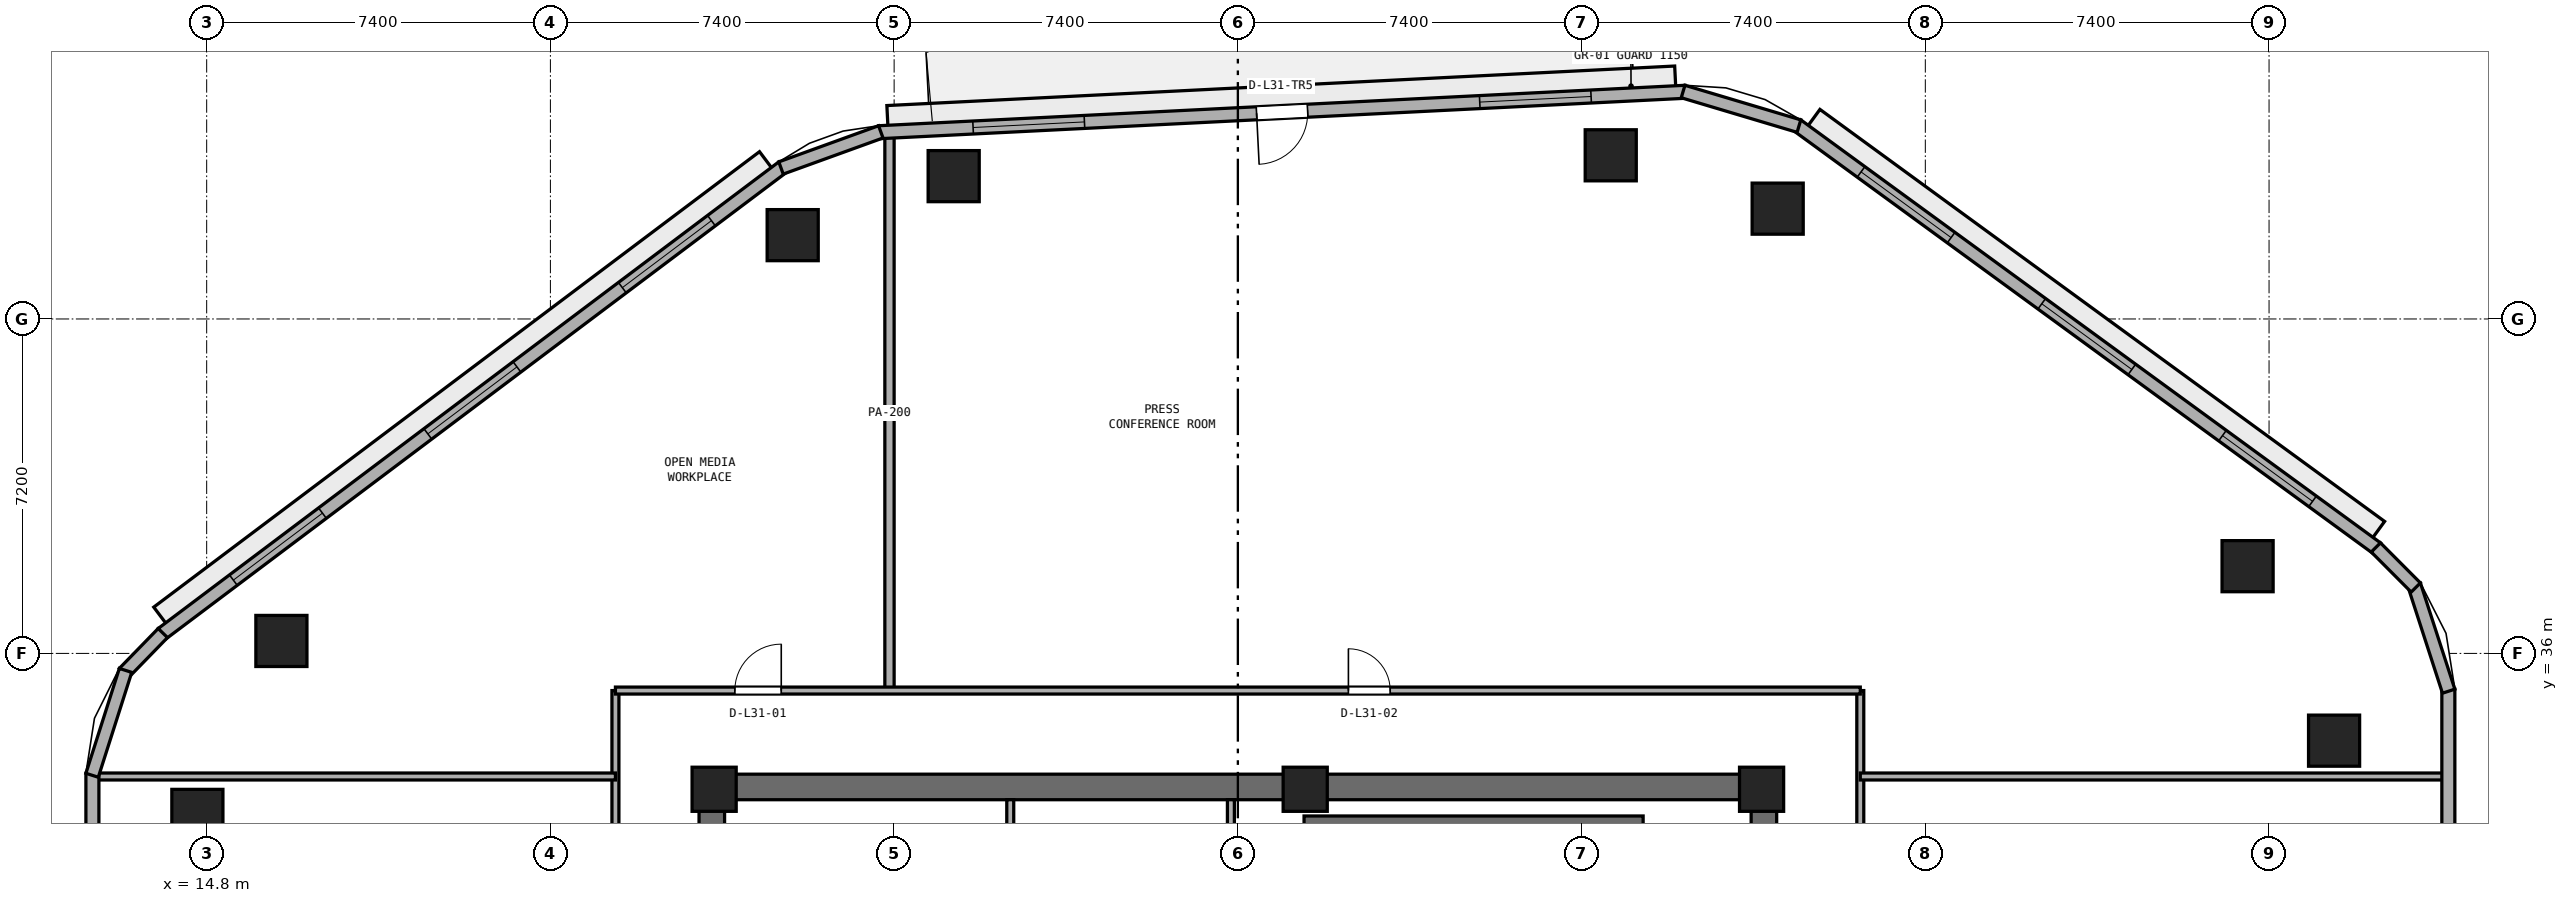
"""IFC4 building model, lengths in metres.
Left out: names, types, materials, properties, quantities, classifications, styles, units other than length and angle.
Written with IfcOpenShell. Run it as: python <this file> out.ifc"""

import sys

from ifc_helpers import new_model, si_unit, direction, frame, frame_2d, origin, origin_2d, place, context, subcontext, project, spatial, rectangle, extrude, element, fill, save


model = new_model("IFC4")
c1 = context("Model", 3, precision=1e-05, world=origin(), true_north=direction((0.0, 1.0)))
c2 = subcontext(c1, "Body", "Model", "MODEL_VIEW")
j1 = project(units=[si_unit("LENGTHUNIT", "METRE"), si_unit("PLANEANGLEUNIT", "RADIAN")], contexts=[c1])
p1 = place(None, origin())
s1 = spatial("IfcSite", under=j1, at=p1, CompositionType="ELEMENT")
p2 = place(p1, origin())
s2 = spatial("IfcBuilding", under=s1, at=p2, CompositionType="ELEMENT")
p3 = place(p2, frame((0.0, 0.0, 125.0)))
s3 = spatial("IfcBuildingStorey", under=s2, at=p3, CompositionType="ELEMENT", Elevation=125.0)
p4 = place(p3, frame((25.4, 33.125, 0.0), z_axis=(0.0, 0.0, 1.0), x_axis=(1.0, 0.0, 0.0)))
e1 = element("IfcWall", 1, at=p4, inside=s3, PredefinedType="SHEAR", context=c2, shape_type="SweptSolid", body=[
    extrude(rectangle(XDim=23.2, YDim=0.55, at=frame_2d((11.6, 0.0))), origin(), (0.0, 0.0, 1.0), 3.54),
])
p5 = place(p3, frame((25.675, 17.55, 0.0), z_axis=(0.0, 0.0, 1.0), x_axis=(0.0, 1.0, 0.0)))
e2 = element("IfcWall", 2, at=p5, inside=s3, PredefinedType="SHEAR", context=c2, shape_type="SweptSolid", body=[
    extrude(rectangle(XDim=15.3, YDim=0.55, at=frame_2d((7.65, 0.0))), origin(), (0.0, 0.0, 1.0), 3.54),
])
p6 = place(p5, frame((6.9, 0.0, 0.0)))
e3 = element("IfcOpeningElement", 3, at=p6, cuts=e2, PredefinedType="OPENING", context=c2, shape_type="SweptSolid", body=[
    extrude(rectangle(XDim=1.5, YDim=2.15, at=frame_2d((0.75, 1.075))), frame((0.0, 0.285, 0.0), z_axis=(0.0, -1.0, 0.0), x_axis=(1.0, 0.0, 0.0)), (0.0, 0.0, 1.0), 0.57),
])
p7 = place(p3, frame((48.325, 17.55, 0.0), z_axis=(0.0, 0.0, 1.0), x_axis=(0.0, 1.0, 0.0)))
e4 = element("IfcWall", 4, at=p7, inside=s3, PredefinedType="SHEAR", context=c2, shape_type="SweptSolid", body=[
    extrude(rectangle(XDim=15.3, YDim=0.55, at=frame_2d((7.65, 0.0))), origin(), (0.0, 0.0, 1.0), 3.54),
])
p8 = place(p7, frame((5.75, 0.0, 0.0)))
e5 = element("IfcOpeningElement", 5, at=p8, cuts=e4, PredefinedType="OPENING", context=c2, shape_type="SweptSolid", body=[
    extrude(rectangle(XDim=1.5, YDim=2.15, at=frame_2d((0.75, 1.075))), frame((0.0, 0.285, 0.0), z_axis=(0.0, -1.0, 0.0), x_axis=(1.0, 0.0, 0.0)), (0.0, 0.0, 1.0), 0.57),
])
for number, where, z_axis, x_axis in (
    (6, (48.275, 33.075, 0.0), (0.0, 0.0, 1.0), (1.0, 0.0, 0.0)),
    (7, (38.45, 33.075, 0.0), (0.0, 0.0, 1.0), (1.0, 0.0, 0.0)),
    (8, (25.725, 33.075, 0.0), (0.0, 0.0, 1.0), (1.0, 0.0, 0.0)),
):
    element("IfcColumn", number, at=place(p3, frame(where, z_axis=z_axis, x_axis=x_axis)), inside=s3, PredefinedType="PILASTER", context=c2, shape_type="SweptSolid", body=[
        extrude(rectangle(XDim=0.95, YDim=0.95, at=origin_2d()), origin(), (0.0, 0.0, 1.0), 3.8),
    ])
for number, where, z_axis, x_axis in (
    (9, (60.6, 34.122, 0.0), (0.0, 0.0, 1.0), (1.0, 0.0, 0.0)),
    (10, (58.738, 37.878, 0.0), (0.0, 0.0, 1.0), (1.0, 0.0, 0.0)),
    (11, (48.622, 45.575, 0.0), (0.0, 0.0, 1.0), (1.0, 0.0, 0.0)),
    (12, (45.028, 46.724, 0.0), (0.0, 0.0, 1.0), (1.0, 0.0, 0.0)),
    (13, (30.882, 46.275, 0.0), (0.0, 0.0, 1.0), (1.0, 0.0, 0.0)),
    (14, (27.416, 45.004, 0.0), (0.0, 0.0, 1.0), (1.0, 0.0, 0.0)),
    (15, (16.409, 36.268, 0.0), (0.0, 0.0, 1.0), (1.0, 0.0, 0.0)),
    (16, (14.6, 32.523, 0.0), (0.0, 0.0, 1.0), (1.0, 0.0, 0.0)),
):
    element("IfcColumn", number, at=place(p3, frame(where, z_axis=z_axis, x_axis=x_axis)), inside=s3, PredefinedType="COLUMN", context=c2, shape_type="SweptSolid", body=[
        extrude(rectangle(XDim=1.1, YDim=1.1, at=origin_2d()), origin(), (0.0, 0.0, 1.0), 3.8),
    ])
p9 = place(p3, frame((38.425, 32.375, 0.0), z_axis=(0.0, 0.0, 1.0), x_axis=(1.0, 0.0, 0.0)))
e17 = element("IfcWall", 17, at=p9, inside=s3, PredefinedType="SHEAR", context=c2, shape_type="SweptSolid", body=[
    extrude(rectangle(XDim=7.3, YDim=0.25, at=frame_2d((3.65, 0.0))), origin(), (0.0, 0.0, 1.0), 3.54),
])
for number, where, z_axis, x_axis in (
    (18, (32.1, 30.65, 0.0), (0.0, 0.0, 1.0), (0.0, 1.0, 0.0)),
    (19, (36.85, 30.65, 0.0), (0.0, 0.0, 1.0), (0.0, 1.0, 0.0)),
):
    element("IfcWall", number, at=place(p3, frame(where, z_axis=z_axis, x_axis=x_axis)), inside=s3, PredefinedType="PARTITIONING", context=c2, shape_type="SweptSolid", body=[
        extrude(rectangle(XDim=2.2, YDim=0.15, at=frame_2d((1.1, 0.0))), origin(), (0.0, 0.0, 1.0), 3.54),
    ])
p10 = place(p3, frame((50.4, 26.8, 0.0), z_axis=(0.0, 0.0, 1.0), x_axis=(0.0, 1.0, 0.0)))
e20 = element("IfcWall", 20, at=p10, inside=s3, PredefinedType="PARTITIONING", context=c2, shape_type="SweptSolid", body=[
    extrude(rectangle(XDim=8.4, YDim=0.15, at=frame_2d((4.2, 0.0))), origin(), (0.0, 0.0, 1.0), 3.54),
])
p11 = place(p10, frame((4.375, 0.0, 0.0)))
e21 = element("IfcOpeningElement", 21, at=p11, cuts=e20, PredefinedType="OPENING", context=c2, shape_type="SweptSolid", body=[
    extrude(rectangle(XDim=0.9, YDim=2.1, at=frame_2d((0.45, 1.05))), frame((0.0, 0.085, 0.0), z_axis=(0.0, -1.0, 0.0), x_axis=(1.0, 0.0, 0.0)), (0.0, 0.0, 1.0), 0.17),
])
p12 = place(p3, frame((29.5, 35.2, 0.0), z_axis=(0.0, 0.0, 1.0), x_axis=(0.0, 1.0, 0.0)))
e22 = element("IfcWall", 22, at=p12, inside=s3, PredefinedType="PARTITIONING", context=c2, shape_type="SweptSolid", body=[
    extrude(rectangle(XDim=11.967, YDim=0.2, at=frame_2d((5.983, 0.0))), origin(), (0.0, 0.0, 1.0), 3.54),
])
p13 = place(p3, frame((23.6, 26.55, 0.0), z_axis=(0.0, 0.0, 1.0), x_axis=(0.0, 1.0, 0.0)))
e23 = element("IfcWall", 23, at=p13, inside=s3, PredefinedType="PARTITIONING", context=c2, shape_type="SweptSolid", body=[
    extrude(rectangle(XDim=8.65, YDim=0.15, at=frame_2d((4.325, 0.0))), origin(), (0.0, 0.0, 1.0), 3.54),
])
p14 = place(p3, frame((12.405, 33.35, 0.0), z_axis=(0.0, 0.0, 1.0), x_axis=(1.0, 0.0, 0.0)))
e24 = element("IfcWall", 24, at=p14, inside=s3, PredefinedType="PARTITIONING", context=c2, shape_type="SweptSolid", body=[
    extrude(rectangle(XDim=11.195, YDim=0.15, at=frame_2d((5.598, 0.0))), origin(), (0.0, 0.0, 1.0), 2.79),
])
p15 = place(p3, frame((50.4, 33.35, 0.0), z_axis=(0.0, 0.0, 1.0), x_axis=(1.0, 0.0, 0.0)))
e25 = element("IfcWall", 25, at=p15, inside=s3, PredefinedType="PARTITIONING", context=c2, shape_type="SweptSolid", body=[
    extrude(rectangle(XDim=12.595, YDim=0.15, at=frame_2d((6.298, 0.0))), origin(), (0.0, 0.0, 1.0), 2.923),
])
p16 = place(p3, frame((23.6, 35.2, 0.0), z_axis=(0.0, 0.0, 1.0), x_axis=(1.0, 0.0, 0.0)))
e26 = element("IfcWall", 26, at=p16, inside=s3, PredefinedType="PARTITIONING", context=c2, shape_type="SweptSolid", body=[
    extrude(rectangle(XDim=26.8, YDim=0.15, at=frame_2d((13.4, 0.0))), origin(), (0.0, 0.0, 1.0), 3.54),
])
p17 = place(p16, frame((2.57, 0.0, 0.0)))
e27 = element("IfcOpeningElement", 27, at=p17, cuts=e26, PredefinedType="OPENING", context=c2, shape_type="SweptSolid", body=[
    extrude(rectangle(XDim=1.0, YDim=2.12, at=frame_2d((0.5, 1.06))), frame((0.0, 0.085, 0.0), z_axis=(0.0, -1.0, 0.0), x_axis=(1.0, 0.0, 0.0)), (0.0, 0.0, 1.0), 0.17),
])
p18 = place(p16, frame((15.78, 0.0, 0.0)))
e28 = element("IfcOpeningElement", 28, at=p18, cuts=e26, PredefinedType="OPENING", context=c2, shape_type="SweptSolid", body=[
    extrude(rectangle(XDim=0.9, YDim=2.1, at=frame_2d((0.45, 1.05))), frame((0.0, 0.085, 0.0), z_axis=(0.0, -1.0, 0.0), x_axis=(1.0, 0.0, 0.0)), (0.0, 0.0, 1.0), 0.17),
])
p19 = place(p3, frame((63.06, 28.27, 0.0), z_axis=(0.0, 0.0, 1.0), x_axis=(0.0, 1.0, 0.0)))
e29 = element("IfcWall", 29, at=p19, inside=s3, PredefinedType="STANDARD", context=c2, shape_type="SweptSolid", body=[
    extrude(rectangle(XDim=6.96, YDim=0.28, at=frame_2d((3.48, 0.0))), origin(), (0.0, 0.0, 1.0), 3.54),
])
p20 = place(p3, frame((61.516, 38.267, 0.0), z_axis=(0.0, 0.0, 1.0), x_axis=(-0.807812505785, 0.589439526582, 0.0)))
e30 = element("IfcWall", 30, at=p20, inside=s3, PredefinedType="STANDARD", context=c2, shape_type="SweptSolid", body=[
    extrude(rectangle(XDim=15.448, YDim=0.28, at=frame_2d((7.724, 0.0))), origin(), (0.0, 0.0, 1.0), 3.54),
])
p21 = place(p20, frame((1.708, 0.0, 0.9)))
e31 = element("IfcOpeningElement", 31, at=p21, cuts=e30, PredefinedType="OPENING", context=c2, shape_type="SweptSolid", body=[
    extrude(rectangle(XDim=2.4, YDim=1.75, at=frame_2d((1.2, 0.875))), frame((0.0, 0.15, 0.0), z_axis=(0.0, -1.0, 0.0), x_axis=(1.0, 0.0, 0.0)), (0.0, 0.0, 1.0), 0.3),
])
p22 = place(p20, frame((6.524, 0.0, 0.9)))
e32 = element("IfcOpeningElement", 32, at=p22, cuts=e30, PredefinedType="OPENING", context=c2, shape_type="SweptSolid", body=[
    extrude(rectangle(XDim=2.4, YDim=1.75, at=frame_2d((1.2, 0.875))), frame((0.0, 0.15, 0.0), z_axis=(0.0, -1.0, 0.0), x_axis=(1.0, 0.0, 0.0)), (0.0, 0.0, 1.0), 0.3),
])
p23 = place(p20, frame((11.34, 0.0, 0.9)))
e33 = element("IfcOpeningElement", 33, at=p23, cuts=e30, PredefinedType="OPENING", context=c2, shape_type="SweptSolid", body=[
    extrude(rectangle(XDim=2.4, YDim=1.75, at=frame_2d((1.2, 0.875))), frame((0.0, 0.15, 0.0), z_axis=(0.0, -1.0, 0.0), x_axis=(1.0, 0.0, 0.0)), (0.0, 0.0, 1.0), 0.3),
])
p24 = place(p3, frame((46.632, 48.091, 0.0), z_axis=(0.0, 0.0, 1.0), x_axis=(-0.998744129094, -0.050101542886, 0.0)))
e34 = element("IfcWall", 34, at=p24, inside=s3, PredefinedType="STANDARD", context=c2, shape_type="SweptSolid", body=[
    extrude(rectangle(XDim=17.382, YDim=0.28, at=frame_2d((8.691, 0.0))), origin(), (0.0, 0.0, 1.0), 3.54),
])
p25 = place(p24, frame((8.141, 0.0, 0.0)))
e35 = element("IfcOpeningElement", 35, at=p25, cuts=e34, PredefinedType="OPENING", context=c2, shape_type="SweptSolid", body=[
    extrude(rectangle(XDim=1.1, YDim=2.2, at=frame_2d((0.55, 1.1))), frame((0.0, 0.15, 0.0), z_axis=(0.0, -1.0, 0.0), x_axis=(1.0, 0.0, 0.0)), (0.0, 0.0, 1.0), 0.3),
])
p26 = place(p24, frame((2.03, 0.0, 0.9)))
e36 = element("IfcOpeningElement", 36, at=p26, cuts=e34, PredefinedType="OPENING", context=c2, shape_type="SweptSolid", body=[
    extrude(rectangle(XDim=2.4, YDim=1.75, at=frame_2d((1.2, 0.875))), frame((0.0, 0.15, 0.0), z_axis=(0.0, -1.0, 0.0), x_axis=(1.0, 0.0, 0.0)), (0.0, 0.0, 1.0), 0.3),
])
p27 = place(p24, frame((12.951, 0.0, 0.9)))
e37 = element("IfcOpeningElement", 37, at=p27, cuts=e34, PredefinedType="OPENING", context=c2, shape_type="SweptSolid", body=[
    extrude(rectangle(XDim=2.4, YDim=1.75, at=frame_2d((1.2, 0.875))), frame((0.0, 0.15, 0.0), z_axis=(0.0, -1.0, 0.0), x_axis=(1.0, 0.0, 0.0)), (0.0, 0.0, 1.0), 0.3),
])
p28 = place(p3, frame((27.201, 46.47, 0.0), z_axis=(0.0, 0.0, 1.0), x_axis=(-0.799280853427, -0.600957666849, 0.0)))
e38 = element("IfcWall", 38, at=p28, inside=s3, PredefinedType="STANDARD", context=c2, shape_type="SweptSolid", body=[
    extrude(rectangle(XDim=16.716, YDim=0.28, at=frame_2d((8.358, 0.0))), origin(), (0.0, 0.0, 1.0), 3.54),
])
p29 = place(p28, frame((1.919, 0.0, 0.9)))
e39 = element("IfcOpeningElement", 39, at=p29, cuts=e38, PredefinedType="OPENING", context=c2, shape_type="SweptSolid", body=[
    extrude(rectangle(XDim=2.4, YDim=1.75, at=frame_2d((1.2, 0.875))), frame((0.0, 0.15, 0.0), z_axis=(0.0, -1.0, 0.0), x_axis=(1.0, 0.0, 0.0)), (0.0, 0.0, 1.0), 0.3),
])
p30 = place(p28, frame((7.158, 0.0, 0.9)))
e40 = element("IfcOpeningElement", 40, at=p30, cuts=e38, PredefinedType="OPENING", context=c2, shape_type="SweptSolid", body=[
    extrude(rectangle(XDim=2.4, YDim=1.75, at=frame_2d((1.2, 0.875))), frame((0.0, 0.15, 0.0), z_axis=(0.0, -1.0, 0.0), x_axis=(1.0, 0.0, 0.0)), (0.0, 0.0, 1.0), 0.3),
])
p31 = place(p28, frame((12.397, 0.0, 0.9)))
e41 = element("IfcOpeningElement", 41, at=p31, cuts=e38, PredefinedType="OPENING", context=c2, shape_type="SweptSolid", body=[
    extrude(rectangle(XDim=2.4, YDim=1.75, at=frame_2d((1.2, 0.875))), frame((0.0, 0.15, 0.0), z_axis=(0.0, -1.0, 0.0), x_axis=(1.0, 0.0, 0.0)), (0.0, 0.0, 1.0), 0.3),
])
p32 = place(p3, frame((12.34, 33.419, 0.0), z_axis=(0.0, 0.0, 1.0), x_axis=(0.0, -1.0, 0.0)))
e42 = element("IfcWall", 42, at=p32, inside=s3, PredefinedType="STANDARD", context=c2, shape_type="SweptSolid", body=[
    extrude(rectangle(XDim=2.769, YDim=0.28, at=frame_2d((1.385, 0.0))), origin(), (0.0, 0.0, 1.0), 3.54),
])
p33 = place(p3, frame((63.067, 35.187, 0.0), z_axis=(0.0, 0.0, 1.0), x_axis=(-0.308390504294, 0.951259847182, 0.0)))
e43 = element("IfcWall", 43, at=p33, inside=s3, PredefinedType="STANDARD", context=c2, shape_type="SweptSolid", body=[
    extrude(rectangle(XDim=2.405, YDim=0.28, at=frame_2d((1.203, 0.0))), origin(), (0.0, 0.0, 1.0), 3.54),
])
p34 = place(p3, frame((62.359, 37.419, 0.0), z_axis=(0.0, 0.0, 1.0), x_axis=(-0.706003104649, 0.708208737751, 0.0)))
e44 = element("IfcWall", 44, at=p34, inside=s3, PredefinedType="STANDARD", context=c2, shape_type="SweptSolid", body=[
    extrude(rectangle(XDim=1.218, YDim=0.28, at=frame_2d((0.609, 0.0))), origin(), (0.0, 0.0, 1.0), 3.54),
])
p35 = place(p3, frame((49.079, 47.352, 0.0), z_axis=(0.0, 0.0, 1.0), x_axis=(-0.958207501709, 0.286074087726, 0.0)))
e45 = element("IfcWall", 45, at=p35, inside=s3, PredefinedType="STANDARD", context=c2, shape_type="SweptSolid", body=[
    extrude(rectangle(XDim=2.603, YDim=0.28, at=frame_2d((1.302, 0.0))), origin(), (0.0, 0.0, 1.0), 3.54),
])
p36 = place(p3, frame((29.313, 47.228, 0.0), z_axis=(0.0, 0.0, 1.0), x_axis=(-0.940226330758, -0.340550212084, 0.0)))
e46 = element("IfcWall", 46, at=p36, inside=s3, PredefinedType="STANDARD", context=c2, shape_type="SweptSolid", body=[
    extrude(rectangle(XDim=2.285, YDim=0.28, at=frame_2d((1.142, 0.0))), origin(), (0.0, 0.0, 1.0), 3.54),
])
p37 = place(p3, frame((13.856, 36.438, 0.0), z_axis=(0.0, 0.0, 1.0), x_axis=(-0.697369094044, -0.716712178404, 0.0)))
e47 = element("IfcWall", 47, at=p37, inside=s3, PredefinedType="STANDARD", context=c2, shape_type="SweptSolid", body=[
    extrude(rectangle(XDim=1.199, YDim=0.28, at=frame_2d((0.6, 0.0))), origin(), (0.0, 0.0, 1.0), 3.54),
])
p38 = place(p3, frame((13.053, 35.634, 0.0), z_axis=(0.0, 0.0, 1.0), x_axis=(-0.303807416298, -0.952733464198, 0.0)))
e48 = element("IfcWall", 48, at=p38, inside=s3, PredefinedType="STANDARD", context=c2, shape_type="SweptSolid", body=[
    extrude(rectangle(XDim=2.37, YDim=0.28, at=frame_2d((1.185, 0.0))), origin(), (0.0, 0.0, 1.0), 3.54),
])
p39 = place(p17, origin())
e49 = element("IfcDoor", 49, at=p39, inside=s3, OperationType="SINGLE_SWING_RIGHT", PredefinedType="DOOR", context=c2, shape_type="SweptSolid", body=[
    extrude(rectangle(XDim=1.0, YDim=2.12, at=frame_2d((0.5, 1.06))), frame((0.0, 0.025, 0.0), z_axis=(0.0, -1.0, 0.0), x_axis=(1.0, 0.0, 0.0)), (0.0, 0.0, 1.0), 0.05),
])
fill(e27, e49)
p40 = place(p18, origin())
e50 = element("IfcDoor", 50, at=p40, inside=s3, OperationType="SINGLE_SWING_LEFT", PredefinedType="DOOR", context=c2, shape_type="SweptSolid", body=[
    extrude(rectangle(XDim=0.9, YDim=2.1, at=frame_2d((0.45, 1.05))), frame((0.0, 0.025, 0.0), z_axis=(0.0, -1.0, 0.0), x_axis=(1.0, 0.0, 0.0)), (0.0, 0.0, 1.0), 0.05),
])
fill(e28, e50)
p41 = place(p21, origin())
e51 = element("IfcWindow", 51, at=p41, inside=s3, PartitioningType="SINGLE_PANEL", PredefinedType="WINDOW", context=c2, shape_type="SweptSolid", body=[
    extrude(rectangle(XDim=2.4, YDim=1.75, at=frame_2d((1.2, 0.875))), frame((0.0, 0.03, 0.0), z_axis=(0.0, -1.0, 0.0), x_axis=(1.0, 0.0, 0.0)), (0.0, 0.0, 1.0), 0.06),
])
fill(e31, e51)
p42 = place(p22, origin())
e52 = element("IfcWindow", 52, at=p42, inside=s3, PartitioningType="SINGLE_PANEL", PredefinedType="WINDOW", context=c2, shape_type="SweptSolid", body=[
    extrude(rectangle(XDim=2.4, YDim=1.75, at=frame_2d((1.2, 0.875))), frame((0.0, 0.03, 0.0), z_axis=(0.0, -1.0, 0.0), x_axis=(1.0, 0.0, 0.0)), (0.0, 0.0, 1.0), 0.06),
])
fill(e32, e52)
p43 = place(p23, origin())
e53 = element("IfcWindow", 53, at=p43, inside=s3, PartitioningType="SINGLE_PANEL", PredefinedType="WINDOW", context=c2, shape_type="SweptSolid", body=[
    extrude(rectangle(XDim=2.4, YDim=1.75, at=frame_2d((1.2, 0.875))), frame((0.0, 0.03, 0.0), z_axis=(0.0, -1.0, 0.0), x_axis=(1.0, 0.0, 0.0)), (0.0, 0.0, 1.0), 0.06),
])
fill(e33, e53)
p44 = place(p25, origin())
e54 = element("IfcDoor", 54, at=p44, inside=s3, OperationType="SINGLE_SWING_RIGHT", PredefinedType="DOOR", context=c2, shape_type="SweptSolid", body=[
    extrude(rectangle(XDim=1.1, YDim=2.2, at=frame_2d((0.55, 1.1))), frame((0.0, 0.025, 0.0), z_axis=(0.0, -1.0, 0.0), x_axis=(1.0, 0.0, 0.0)), (0.0, 0.0, 1.0), 0.05),
])
fill(e35, e54)
p45 = place(p26, origin())
e55 = element("IfcWindow", 55, at=p45, inside=s3, PartitioningType="SINGLE_PANEL", PredefinedType="WINDOW", context=c2, shape_type="SweptSolid", body=[
    extrude(rectangle(XDim=2.4, YDim=1.75, at=frame_2d((1.2, 0.875))), frame((0.0, 0.03, 0.0), z_axis=(0.0, -1.0, 0.0), x_axis=(1.0, 0.0, 0.0)), (0.0, 0.0, 1.0), 0.06),
])
fill(e36, e55)
p46 = place(p27, origin())
e56 = element("IfcWindow", 56, at=p46, inside=s3, PartitioningType="SINGLE_PANEL", PredefinedType="WINDOW", context=c2, shape_type="SweptSolid", body=[
    extrude(rectangle(XDim=2.4, YDim=1.75, at=frame_2d((1.2, 0.875))), frame((0.0, 0.03, 0.0), z_axis=(0.0, -1.0, 0.0), x_axis=(1.0, 0.0, 0.0)), (0.0, 0.0, 1.0), 0.06),
])
fill(e37, e56)
p47 = place(p29, origin())
e57 = element("IfcWindow", 57, at=p47, inside=s3, PartitioningType="SINGLE_PANEL", PredefinedType="WINDOW", context=c2, shape_type="SweptSolid", body=[
    extrude(rectangle(XDim=2.4, YDim=1.75, at=frame_2d((1.2, 0.875))), frame((0.0, 0.03, 0.0), z_axis=(0.0, -1.0, 0.0), x_axis=(1.0, 0.0, 0.0)), (0.0, 0.0, 1.0), 0.06),
])
fill(e39, e57)
p48 = place(p30, origin())
e58 = element("IfcWindow", 58, at=p48, inside=s3, PartitioningType="SINGLE_PANEL", PredefinedType="WINDOW", context=c2, shape_type="SweptSolid", body=[
    extrude(rectangle(XDim=2.4, YDim=1.75, at=frame_2d((1.2, 0.875))), frame((0.0, 0.03, 0.0), z_axis=(0.0, -1.0, 0.0), x_axis=(1.0, 0.0, 0.0)), (0.0, 0.0, 1.0), 0.06),
])
fill(e40, e58)
p49 = place(p31, origin())
e59 = element("IfcWindow", 59, at=p49, inside=s3, PartitioningType="SINGLE_PANEL", PredefinedType="WINDOW", context=c2, shape_type="SweptSolid", body=[
    extrude(rectangle(XDim=2.4, YDim=1.75, at=frame_2d((1.2, 0.875))), frame((0.0, 0.03, 0.0), z_axis=(0.0, -1.0, 0.0), x_axis=(1.0, 0.0, 0.0)), (0.0, 0.0, 1.0), 0.06),
])
fill(e41, e59)
save(model, sys.argv[1])
